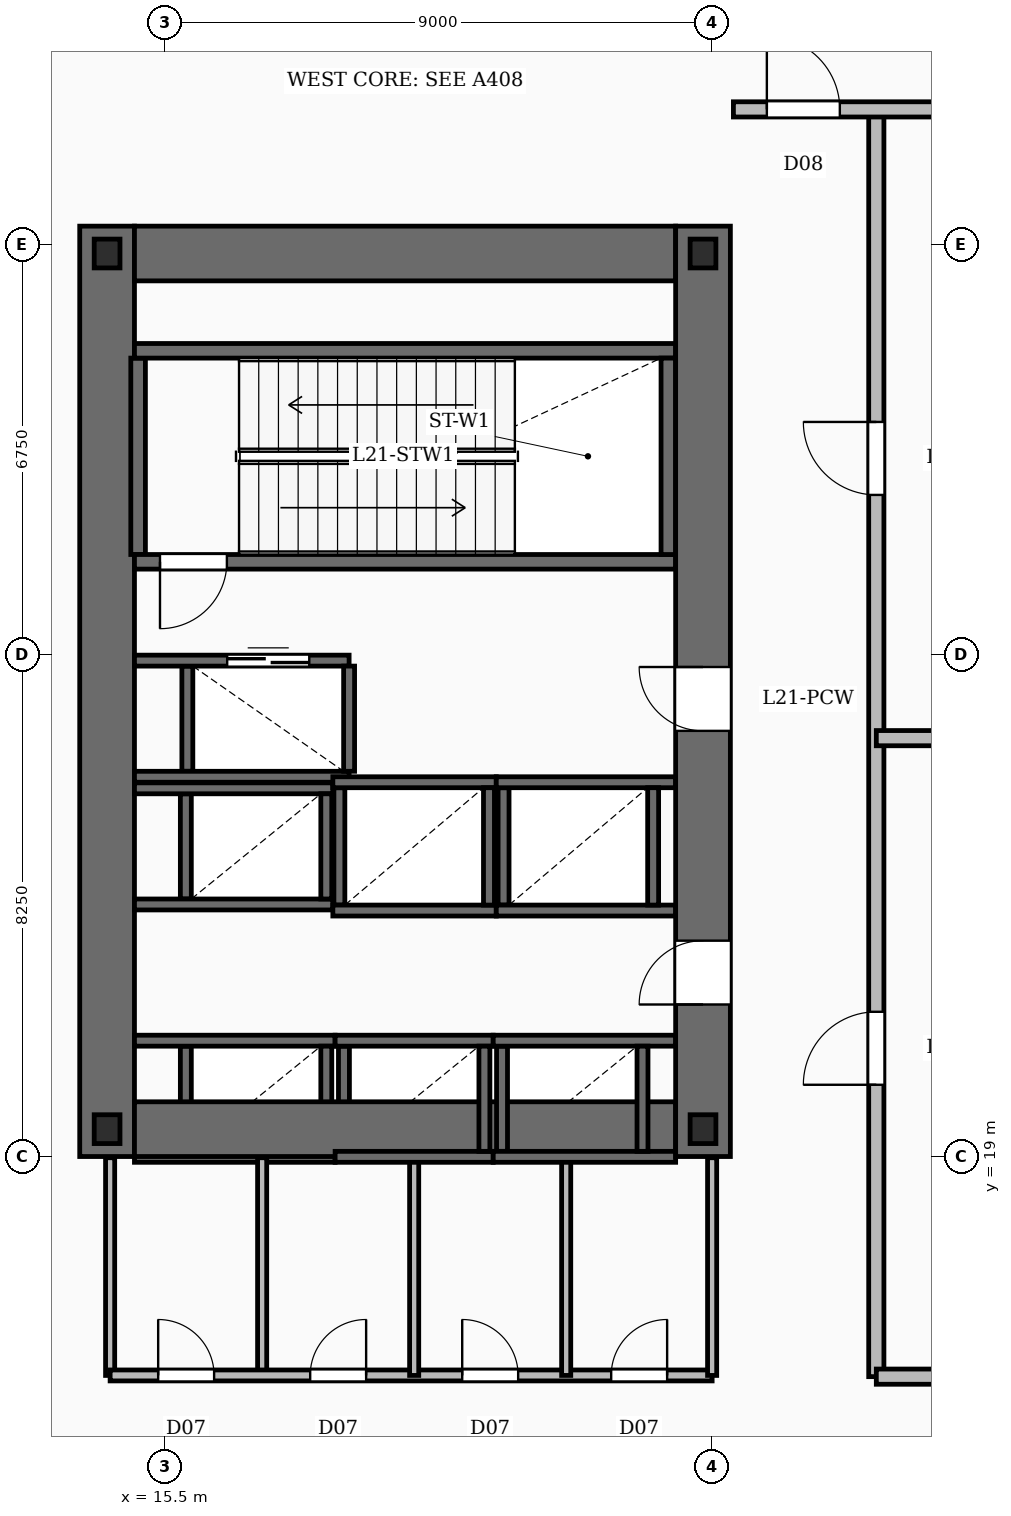
"""IFC4 building model, lengths in metres.
Left out: names, types, materials, properties, quantities, classifications, styles, units other than length and angle.
Written with IfcOpenShell. Run it as: python <this file> out.ifc"""

import sys

from ifc_helpers import new_model, si_unit, direction, frame, frame_2d, origin, origin_2d, place, context, subcontext, project, spatial, rectangle, i_section, extrude, element, fill, save


model = new_model("IFC4")
c1 = context("Model", 3, precision=1e-05, world=origin(), true_north=direction((0.0, 1.0)))
c2 = subcontext(c1, "Body", "Model", "MODEL_VIEW")
j1 = project(units=[si_unit("LENGTHUNIT", "METRE"), si_unit("PLANEANGLEUNIT", "RADIAN")], contexts=[c1])
p1 = place(None, origin())
s1 = spatial("IfcSite", under=j1, at=p1, CompositionType="ELEMENT")
p2 = place(p1, origin())
s2 = spatial("IfcBuilding", under=s1, at=p2, CompositionType="ELEMENT")
p3 = place(p2, frame((0.0, 0.0, 94.5)))
s3 = spatial("IfcBuildingStorey", under=s2, at=p3, CompositionType="ELEMENT", Elevation=94.5)
p4 = place(p3, frame((14.55, 19.0, -0.42), z_axis=(0.0, 0.0, 1.0), x_axis=(0.0, 1.0, 0.0)))
e1 = element("IfcWall", 1, at=p4, inside=s3, PredefinedType="SHEAR", context=c2, shape_type="SweptSolid", body=[
    extrude(rectangle(XDim=15.3, YDim=0.9, at=frame_2d((7.65, 0.0))), origin(), (0.0, 0.0, 1.0), 5.17),
])
p5 = place(p3, frame((24.35, 19.0, -0.42), z_axis=(0.0, 0.0, 1.0), x_axis=(0.0, 1.0, 0.0)))
e2 = element("IfcWall", 2, at=p5, inside=s3, PredefinedType="SHEAR", context=c2, shape_type="SweptSolid", body=[
    extrude(rectangle(XDim=15.3, YDim=0.9, at=frame_2d((7.65, 0.0))), origin(), (0.0, 0.0, 1.0), 5.17),
])
p6 = place(p5, frame((2.5, 0.0, 0.42)))
e3 = element("IfcOpeningElement", 3, at=p6, cuts=e2, PredefinedType="OPENING", context=c2, shape_type="SweptSolid", body=[
    extrude(rectangle(XDim=1.05, YDim=2.15, at=frame_2d((0.525, 1.075))), frame((0.0, 0.46, 0.0), z_axis=(0.0, -1.0, 0.0), x_axis=(1.0, 0.0, 0.0)), (0.0, 0.0, 1.0), 0.92),
])
p7 = place(p5, frame((7.0, 0.0, 0.42)))
e4 = element("IfcOpeningElement", 4, at=p7, cuts=e2, PredefinedType="OPENING", context=c2, shape_type="SweptSolid", body=[
    extrude(rectangle(XDim=1.05, YDim=2.15, at=frame_2d((0.525, 1.075))), frame((0.0, 0.46, 0.0), z_axis=(0.0, -1.0, 0.0), x_axis=(1.0, 0.0, 0.0)), (0.0, 0.0, 1.0), 0.92),
])
for number, where, z_axis, x_axis in (
    (5, (15.0, 19.45, -0.42), (0.0, 0.0, 1.0), (1.0, 0.0, 0.0)),
    (6, (15.0, 33.85, -0.42), (0.0, 0.0, 1.0), (1.0, 0.0, 0.0)),
):
    element("IfcWall", number, at=place(p3, frame(where, z_axis=z_axis, x_axis=x_axis)), inside=s3, PredefinedType="SHEAR", context=c2, shape_type="SweptSolid", body=[
        extrude(rectangle(XDim=8.9, YDim=0.9, at=frame_2d((4.45, 0.0))), origin(), (0.0, 0.0, 1.0), 5.17),
    ])
for number, where, z_axis, x_axis in (
    (7, (14.55, 19.45, -0.42), (0.0, 0.0, 1.0), (1.0, 0.0, 0.0)),
    (8, (24.35, 19.45, -0.42), (0.0, 0.0, 1.0), (1.0, 0.0, 0.0)),
    (9, (14.55, 33.85, -0.42), (0.0, 0.0, 1.0), (1.0, 0.0, 0.0)),
    (10, (24.35, 33.85, -0.42), (0.0, 0.0, 1.0), (1.0, 0.0, 0.0)),
):
    element("IfcColumn", number, at=place(p3, frame(where, z_axis=z_axis, x_axis=x_axis)), inside=s3, PredefinedType="COLUMN", context=c2, shape_type="SweptSolid", body=[
        extrude(i_section(OverallWidth=0.424, OverallDepth=0.474, WebThickness=0.048, FlangeThickness=0.077, FilletRadius=0.02, at=origin_2d()), origin(), (0.0, 0.0, 1.0), 5.17),
    ])
p8 = place(p3, frame((23.9, 28.78, 0.0), z_axis=(0.0, 0.0, 1.0), x_axis=(-1.0, 0.0, 0.0)))
e11 = element("IfcWall", 11, at=p8, inside=s3, PredefinedType="SOLIDWALL", context=c2, shape_type="SweptSolid", body=[
    extrude(rectangle(XDim=8.9, YDim=0.24, at=frame_2d((4.45, 0.0))), origin(), (0.0, 0.0, 1.0), 4.75),
])
p9 = place(p8, frame((7.38, 0.0, 0.0)))
e12 = element("IfcOpeningElement", 12, at=p9, cuts=e11, PredefinedType="OPENING", context=c2, shape_type="SweptSolid", body=[
    extrude(rectangle(XDim=1.1, YDim=2.15, at=frame_2d((0.55, 1.075))), frame((0.0, 0.13, 0.0), z_axis=(0.0, -1.0, 0.0), x_axis=(1.0, 0.0, 0.0)), (0.0, 0.0, 1.0), 0.26),
])
p10 = place(p3, frame((15.0, 32.25, 0.0), z_axis=(0.0, 0.0, 1.0), x_axis=(1.0, 0.0, 0.0)))
e13 = element("IfcWall", 13, at=p10, inside=s3, PredefinedType="SOLIDWALL", context=c2, shape_type="SweptSolid", body=[
    extrude(rectangle(XDim=8.9, YDim=0.24, at=frame_2d((4.45, 0.0))), origin(), (0.0, 0.0, 1.0), 4.75),
])
for number, where, z_axis, x_axis in (
    (14, (15.06, 28.9, 0.0), (0.0, 0.0, 1.0), (0.0, 1.0, 0.0)),
    (15, (23.78, 28.9, 0.0), (0.0, 0.0, 1.0), (0.0, 1.0, 0.0)),
):
    element("IfcWall", number, at=place(p3, frame(where, z_axis=z_axis, x_axis=x_axis)), inside=s3, PredefinedType="SOLIDWALL", context=c2, shape_type="SweptSolid", body=[
        extrude(rectangle(XDim=3.23, YDim=0.24, at=frame_2d((1.615, 0.0))), origin(), (0.0, 0.0, 1.0), 4.75),
    ])
for number, where, z_axis, x_axis in (
    (16, (15.0, 20.905, 0.0), (0.0, 0.0, 1.0), (1.0, 0.0, 0.0)),
    (17, (15.0, 18.995, 0.0), (0.0, 0.0, 1.0), (1.0, 0.0, 0.0)),
):
    element("IfcWall", number, at=place(p3, frame(where, z_axis=z_axis, x_axis=x_axis)), inside=s3, PredefinedType="SOLIDWALL", context=c2, shape_type="SweptSolid", body=[
        extrude(rectangle(XDim=3.3, YDim=0.18, at=frame_2d((1.65, 0.0))), origin(), (0.0, 0.0, 1.0), 4.75),
    ])
for number, where, z_axis, x_axis in (
    (18, (15.845, 19.085, 0.0), (0.0, 0.0, 1.0), (0.0, 1.0, 0.0)),
    (19, (18.155, 19.085, 0.0), (0.0, 0.0, 1.0), (0.0, 1.0, 0.0)),
):
    element("IfcWall", number, at=place(p3, frame(where, z_axis=z_axis, x_axis=x_axis)), inside=s3, PredefinedType="SOLIDWALL", context=c2, shape_type="SweptSolid", body=[
        extrude(rectangle(XDim=1.73, YDim=0.18, at=frame_2d((0.865, 0.0))), origin(), (0.0, 0.0, 1.0), 4.75),
    ])
for number, where, z_axis, x_axis in (
    (20, (18.3, 20.905, 0.0), (0.0, 0.0, 1.0), (1.0, 0.0, 0.0)),
    (21, (18.3, 18.995, 0.0), (0.0, 0.0, 1.0), (1.0, 0.0, 0.0)),
):
    element("IfcWall", number, at=place(p3, frame(where, z_axis=z_axis, x_axis=x_axis)), inside=s3, PredefinedType="SOLIDWALL", context=c2, shape_type="SweptSolid", body=[
        extrude(rectangle(XDim=2.6, YDim=0.18, at=frame_2d((1.3, 0.0))), origin(), (0.0, 0.0, 1.0), 4.75),
    ])
for number, where, z_axis, x_axis in (
    (22, (18.445, 19.085, 0.0), (0.0, 0.0, 1.0), (0.0, 1.0, 0.0)),
    (23, (20.755, 19.085, 0.0), (0.0, 0.0, 1.0), (0.0, 1.0, 0.0)),
):
    element("IfcWall", number, at=place(p3, frame(where, z_axis=z_axis, x_axis=x_axis)), inside=s3, PredefinedType="SOLIDWALL", context=c2, shape_type="SweptSolid", body=[
        extrude(rectangle(XDim=1.73, YDim=0.18, at=frame_2d((0.865, 0.0))), origin(), (0.0, 0.0, 1.0), 4.75),
    ])
for number, where, z_axis, x_axis in (
    (24, (20.9, 20.905, 0.0), (0.0, 0.0, 1.0), (1.0, 0.0, 0.0)),
    (25, (20.9, 18.995, 0.0), (0.0, 0.0, 1.0), (1.0, 0.0, 0.0)),
):
    element("IfcWall", number, at=place(p3, frame(where, z_axis=z_axis, x_axis=x_axis)), inside=s3, PredefinedType="SOLIDWALL", context=c2, shape_type="SweptSolid", body=[
        extrude(rectangle(XDim=3.0, YDim=0.18, at=frame_2d((1.5, 0.0))), origin(), (0.0, 0.0, 1.0), 4.75),
    ])
for number, where, z_axis, x_axis in (
    (26, (21.045, 19.085, 0.0), (0.0, 0.0, 1.0), (0.0, 1.0, 0.0)),
    (27, (23.355, 19.085, 0.0), (0.0, 0.0, 1.0), (0.0, 1.0, 0.0)),
):
    element("IfcWall", number, at=place(p3, frame(where, z_axis=z_axis, x_axis=x_axis)), inside=s3, PredefinedType="SOLIDWALL", context=c2, shape_type="SweptSolid", body=[
        extrude(rectangle(XDim=1.73, YDim=0.18, at=frame_2d((0.865, 0.0))), origin(), (0.0, 0.0, 1.0), 4.75),
    ])
for number, where, z_axis, x_axis in (
    (28, (15.0, 25.055, 0.0), (0.0, 0.0, 1.0), (1.0, 0.0, 0.0)),
    (29, (15.0, 23.145, 0.0), (0.0, 0.0, 1.0), (1.0, 0.0, 0.0)),
):
    element("IfcWall", number, at=place(p3, frame(where, z_axis=z_axis, x_axis=x_axis)), inside=s3, PredefinedType="SOLIDWALL", context=c2, shape_type="SweptSolid", body=[
        extrude(rectangle(XDim=3.262, YDim=0.18, at=frame_2d((1.631, 0.0))), origin(), (0.0, 0.0, 1.0), 4.75),
    ])
for number, where, z_axis, x_axis in (
    (30, (15.845, 23.235, 0.0), (0.0, 0.0, 1.0), (0.0, 1.0, 0.0)),
    (31, (18.155, 23.235, 0.0), (0.0, 0.0, 1.0), (0.0, 1.0, 0.0)),
):
    element("IfcWall", number, at=place(p3, frame(where, z_axis=z_axis, x_axis=x_axis)), inside=s3, PredefinedType="SOLIDWALL", context=c2, shape_type="SweptSolid", body=[
        extrude(rectangle(XDim=1.73, YDim=0.18, at=frame_2d((0.865, 0.0))), origin(), (0.0, 0.0, 1.0), 4.75),
    ])
for number, where, z_axis, x_axis in (
    (32, (18.262, 25.155, 0.0), (0.0, 0.0, 1.0), (1.0, 0.0, 0.0)),
    (33, (18.262, 23.045, 0.0), (0.0, 0.0, 1.0), (1.0, 0.0, 0.0)),
):
    element("IfcWall", number, at=place(p3, frame(where, z_axis=z_axis, x_axis=x_axis)), inside=s3, PredefinedType="SOLIDWALL", context=c2, shape_type="SweptSolid", body=[
        extrude(rectangle(XDim=2.688, YDim=0.18, at=frame_2d((1.344, 0.0))), origin(), (0.0, 0.0, 1.0), 4.75),
    ])
for number, where, z_axis, x_axis in (
    (34, (18.37, 23.135, 0.0), (0.0, 0.0, 1.0), (0.0, 1.0, 0.0)),
    (35, (20.83, 23.135, 0.0), (0.0, 0.0, 1.0), (0.0, 1.0, 0.0)),
):
    element("IfcWall", number, at=place(p3, frame(where, z_axis=z_axis, x_axis=x_axis)), inside=s3, PredefinedType="SOLIDWALL", context=c2, shape_type="SweptSolid", body=[
        extrude(rectangle(XDim=1.93, YDim=0.18, at=frame_2d((0.965, 0.0))), origin(), (0.0, 0.0, 1.0), 4.75),
    ])
for number, where, z_axis, x_axis in (
    (36, (20.95, 25.155, 0.0), (0.0, 0.0, 1.0), (1.0, 0.0, 0.0)),
    (37, (20.95, 23.045, 0.0), (0.0, 0.0, 1.0), (1.0, 0.0, 0.0)),
):
    element("IfcWall", number, at=place(p3, frame(where, z_axis=z_axis, x_axis=x_axis)), inside=s3, PredefinedType="SOLIDWALL", context=c2, shape_type="SweptSolid", body=[
        extrude(rectangle(XDim=2.95, YDim=0.18, at=frame_2d((1.475, 0.0))), origin(), (0.0, 0.0, 1.0), 4.75),
    ])
for number, where, z_axis, x_axis in (
    (38, (21.07, 23.135, 0.0), (0.0, 0.0, 1.0), (0.0, 1.0, 0.0)),
    (39, (23.53, 23.135, 0.0), (0.0, 0.0, 1.0), (0.0, 1.0, 0.0)),
):
    element("IfcWall", number, at=place(p3, frame(where, z_axis=z_axis, x_axis=x_axis)), inside=s3, PredefinedType="SOLIDWALL", context=c2, shape_type="SweptSolid", body=[
        extrude(rectangle(XDim=1.93, YDim=0.18, at=frame_2d((0.965, 0.0))), origin(), (0.0, 0.0, 1.0), 4.75),
    ])
p11 = place(p3, frame((15.0, 27.155, 0.0), z_axis=(0.0, 0.0, 1.0), x_axis=(1.0, 0.0, 0.0)))
e40 = element("IfcWall", 40, at=p11, inside=s3, PredefinedType="SOLIDWALL", context=c2, shape_type="SweptSolid", body=[
    extrude(rectangle(XDim=3.53, YDim=0.18, at=frame_2d((1.765, 0.0))), origin(), (0.0, 0.0, 1.0), 4.75),
])
p12 = place(p11, frame((1.525, 0.0, 0.0)))
e41 = element("IfcOpeningElement", 41, at=p12, cuts=e40, PredefinedType="OPENING", context=c2, shape_type="SweptSolid", body=[
    extrude(rectangle(XDim=1.35, YDim=2.3, at=frame_2d((0.675, 1.15))), frame((0.0, 0.1, 0.0), z_axis=(0.0, -1.0, 0.0), x_axis=(1.0, 0.0, 0.0)), (0.0, 0.0, 1.0), 0.2),
])
p13 = place(p3, frame((15.0, 25.245, 0.0), z_axis=(0.0, 0.0, 1.0), x_axis=(1.0, 0.0, 0.0)))
e42 = element("IfcWall", 42, at=p13, inside=s3, PredefinedType="SOLIDWALL", context=c2, shape_type="SweptSolid", body=[
    extrude(rectangle(XDim=3.53, YDim=0.18, at=frame_2d((1.765, 0.0))), origin(), (0.0, 0.0, 1.0), 4.75),
])
for number, where, z_axis, x_axis in (
    (43, (15.87, 25.335, 0.0), (0.0, 0.0, 1.0), (0.0, 1.0, 0.0)),
    (44, (18.53, 25.335, 0.0), (0.0, 0.0, 1.0), (0.0, 1.0, 0.0)),
):
    element("IfcWall", number, at=place(p3, frame(where, z_axis=z_axis, x_axis=x_axis)), inside=s3, PredefinedType="SOLIDWALL", context=c2, shape_type="SweptSolid", body=[
        extrude(rectangle(XDim=1.73, YDim=0.18, at=frame_2d((0.865, 0.0))), origin(), (0.0, 0.0, 1.0), 4.75),
    ])
for number, where, z_axis, x_axis in (
    (45, (17.1, 15.4, 0.0), (0.0, 0.0, 1.0), (0.0, 1.0, 0.0)),
    (46, (19.6, 15.4, 0.0), (0.0, 0.0, 1.0), (0.0, 1.0, 0.0)),
    (47, (22.1, 15.4, 0.0), (0.0, 0.0, 1.0), (0.0, 1.0, 0.0)),
):
    element("IfcWall", number, at=place(p3, frame(where, z_axis=z_axis, x_axis=x_axis)), inside=s3, PredefinedType="PARTITIONING", context=c2, shape_type="SweptSolid", body=[
        extrude(rectangle(XDim=3.58, YDim=0.15, at=frame_2d((1.79, 0.0))), origin(), (0.0, 0.0, 1.0), 3.81),
    ])
p14 = place(p3, frame((14.6, 15.4, 0.0), z_axis=(0.0, 0.0, 1.0), x_axis=(1.0, 0.0, 0.0)))
e48 = element("IfcWall", 48, at=p14, inside=s3, PredefinedType="PARTITIONING", context=c2, shape_type="SweptSolid", body=[
    extrude(rectangle(XDim=9.9, YDim=0.18, at=frame_2d((4.95, 0.0))), origin(), (0.0, 0.0, 1.0), 3.81),
])
p15 = place(p14, frame((0.79, 0.0, 0.0)))
e49 = element("IfcOpeningElement", 49, at=p15, cuts=e48, PredefinedType="OPENING", context=c2, shape_type="SweptSolid", body=[
    extrude(rectangle(XDim=0.92, YDim=2.1, at=frame_2d((0.46, 1.05))), frame((0.0, 0.1, 0.0), z_axis=(0.0, -1.0, 0.0), x_axis=(1.0, 0.0, 0.0)), (0.0, 0.0, 1.0), 0.2),
])
p16 = place(p14, frame((3.29, 0.0, 0.0)))
e50 = element("IfcOpeningElement", 50, at=p16, cuts=e48, PredefinedType="OPENING", context=c2, shape_type="SweptSolid", body=[
    extrude(rectangle(XDim=0.92, YDim=2.1, at=frame_2d((0.46, 1.05))), frame((0.0, 0.1, 0.0), z_axis=(0.0, -1.0, 0.0), x_axis=(1.0, 0.0, 0.0)), (0.0, 0.0, 1.0), 0.2),
])
p17 = place(p14, frame((5.79, 0.0, 0.0)))
e51 = element("IfcOpeningElement", 51, at=p17, cuts=e48, PredefinedType="OPENING", context=c2, shape_type="SweptSolid", body=[
    extrude(rectangle(XDim=0.92, YDim=2.1, at=frame_2d((0.46, 1.05))), frame((0.0, 0.1, 0.0), z_axis=(0.0, -1.0, 0.0), x_axis=(1.0, 0.0, 0.0)), (0.0, 0.0, 1.0), 0.2),
])
p18 = place(p14, frame((8.24, 0.0, 0.0)))
e52 = element("IfcOpeningElement", 52, at=p18, cuts=e48, PredefinedType="OPENING", context=c2, shape_type="SweptSolid", body=[
    extrude(rectangle(XDim=0.92, YDim=2.1, at=frame_2d((0.46, 1.05))), frame((0.0, 0.1, 0.0), z_axis=(0.0, -1.0, 0.0), x_axis=(1.0, 0.0, 0.0)), (0.0, 0.0, 1.0), 0.2),
])
p19 = place(p3, frame((14.6, 15.4, 0.0), z_axis=(0.0, 0.0, 1.0), x_axis=(0.0, 1.0, 0.0)))
e53 = element("IfcWall", 53, at=p19, inside=s3, PredefinedType="PARTITIONING", context=c2, shape_type="SweptSolid", body=[
    extrude(rectangle(XDim=3.58, YDim=0.15, at=frame_2d((1.79, 0.0))), origin(), (0.0, 0.0, 1.0), 2.8),
])
p20 = place(p3, frame((24.5, 15.4, 0.0), z_axis=(0.0, 0.0, 1.0), x_axis=(0.0, 1.0, 0.0)))
e54 = element("IfcWall", 54, at=p20, inside=s3, PredefinedType="PARTITIONING", context=c2, shape_type="SweptSolid", body=[
    extrude(rectangle(XDim=3.58, YDim=0.15, at=frame_2d((1.79, 0.0))), origin(), (0.0, 0.0, 1.0), 3.81),
])
for number, where, z_axis, x_axis in (
    (55, (27.2, 25.88, 0.0), (0.0, 0.0, 1.0), (1.0, 0.0, 0.0)),
    (56, (27.2, 15.38, 0.0), (0.0, 0.0, 1.0), (1.0, 0.0, 0.0)),
):
    element("IfcWall", number, at=place(p3, frame(where, z_axis=z_axis, x_axis=x_axis)), inside=s3, PredefinedType="SOLIDWALL", context=c2, shape_type="SweptSolid", body=[
        extrude(rectangle(XDim=20.5, YDim=0.25, at=frame_2d((10.25, 0.0))), origin(), (0.0, 0.0, 1.0), 3.81),
    ])
p21 = place(p3, frame((24.85, 36.22, 0.0), z_axis=(0.0, 0.0, 1.0), x_axis=(1.0, 0.0, 0.0)))
e57 = element("IfcWall", 57, at=p21, inside=s3, PredefinedType="SOLIDWALL", context=c2, shape_type="SweptSolid", body=[
    extrude(rectangle(XDim=25.2, YDim=0.25, at=frame_2d((12.6, 0.0))), origin(), (0.0, 0.0, 1.0), 3.81),
])
p22 = place(p21, frame((0.55, 0.0, 0.0)))
e58 = element("IfcOpeningElement", 58, at=p22, cuts=e57, PredefinedType="OPENING", context=c2, shape_type="SweptSolid", body=[
    extrude(rectangle(XDim=1.2, YDim=2.2, at=frame_2d((0.6, 1.1))), frame((0.0, 0.135, 0.0), z_axis=(0.0, -1.0, 0.0), x_axis=(1.0, 0.0, 0.0)), (0.0, 0.0, 1.0), 0.27),
])
p23 = place(p3, frame((27.2, 15.38, 0.0), z_axis=(0.0, 0.0, 1.0), x_axis=(0.0, 1.0, 0.0)))
e59 = element("IfcWall", 59, at=p23, inside=s3, PredefinedType="SOLIDWALL", context=c2, shape_type="SweptSolid", body=[
    extrude(rectangle(XDim=20.84, YDim=0.25, at=frame_2d((10.42, 0.0))), origin(), (0.0, 0.0, 1.0), 3.81),
])
p24 = place(p23, frame((4.8, 0.0, 0.0)))
e60 = element("IfcOpeningElement", 60, at=p24, cuts=e59, PredefinedType="OPENING", context=c2, shape_type="SweptSolid", body=[
    extrude(rectangle(XDim=1.2, YDim=2.2, at=frame_2d((0.6, 1.1))), frame((0.0, 0.135, 0.0), z_axis=(0.0, -1.0, 0.0), x_axis=(1.0, 0.0, 0.0)), (0.0, 0.0, 1.0), 0.27),
])
p25 = place(p23, frame((14.5, 0.0, 0.0)))
e61 = element("IfcOpeningElement", 61, at=p25, cuts=e59, PredefinedType="OPENING", context=c2, shape_type="SweptSolid", body=[
    extrude(rectangle(XDim=1.2, YDim=2.2, at=frame_2d((0.6, 1.1))), frame((0.0, 0.135, 0.0), z_axis=(0.0, -1.0, 0.0), x_axis=(1.0, 0.0, 0.0)), (0.0, 0.0, 1.0), 0.27),
])
p26 = place(p6, origin())
e62 = element("IfcDoor", 62, at=p26, inside=s3, OperationType="SINGLE_SWING_LEFT", PredefinedType="DOOR", context=c2, shape_type="SweptSolid", body=[
    extrude(rectangle(XDim=1.05, YDim=2.15, at=frame_2d((0.525, 1.075))), frame((0.0, 0.025, 0.0), z_axis=(0.0, -1.0, 0.0), x_axis=(1.0, 0.0, 0.0)), (0.0, 0.0, 1.0), 0.05),
])
fill(e3, e62)
p27 = place(p7, origin())
e63 = element("IfcDoor", 63, at=p27, inside=s3, OperationType="SINGLE_SWING_RIGHT", PredefinedType="DOOR", context=c2, shape_type="SweptSolid", body=[
    extrude(rectangle(XDim=1.05, YDim=2.15, at=frame_2d((0.525, 1.075))), frame((0.0, 0.025, 0.0), z_axis=(0.0, -1.0, 0.0), x_axis=(1.0, 0.0, 0.0)), (0.0, 0.0, 1.0), 0.05),
])
fill(e4, e63)
p28 = place(p9, origin())
e64 = element("IfcDoor", 64, at=p28, inside=s3, OperationType="SINGLE_SWING_RIGHT", PredefinedType="DOOR", context=c2, shape_type="SweptSolid", body=[
    extrude(rectangle(XDim=1.1, YDim=2.15, at=frame_2d((0.55, 1.075))), frame((0.0, 0.025, 0.0), z_axis=(0.0, -1.0, 0.0), x_axis=(1.0, 0.0, 0.0)), (0.0, 0.0, 1.0), 0.05),
])
fill(e12, e64)
p29 = place(p12, origin())
e65 = element("IfcDoor", 65, at=p29, inside=s3, OperationType="DOUBLE_DOOR_SLIDING", PredefinedType="DOOR", context=c2, shape_type="SweptSolid", body=[
    extrude(rectangle(XDim=1.35, YDim=2.3, at=frame_2d((0.675, 1.15))), frame((0.0, 0.025, 0.0), z_axis=(0.0, -1.0, 0.0), x_axis=(1.0, 0.0, 0.0)), (0.0, 0.0, 1.0), 0.05),
])
fill(e41, e65)
p30 = place(p15, origin())
e66 = element("IfcDoor", 66, at=p30, inside=s3, OperationType="SINGLE_SWING_LEFT", PredefinedType="DOOR", context=c2, shape_type="SweptSolid", body=[
    extrude(rectangle(XDim=0.92, YDim=2.1, at=frame_2d((0.46, 1.05))), frame((0.0, 0.025, 0.0), z_axis=(0.0, -1.0, 0.0), x_axis=(1.0, 0.0, 0.0)), (0.0, 0.0, 1.0), 0.05),
])
fill(e49, e66)
p31 = place(p16, origin())
e67 = element("IfcDoor", 67, at=p31, inside=s3, OperationType="SINGLE_SWING_RIGHT", PredefinedType="DOOR", context=c2, shape_type="SweptSolid", body=[
    extrude(rectangle(XDim=0.92, YDim=2.1, at=frame_2d((0.46, 1.05))), frame((0.0, 0.025, 0.0), z_axis=(0.0, -1.0, 0.0), x_axis=(1.0, 0.0, 0.0)), (0.0, 0.0, 1.0), 0.05),
])
fill(e50, e67)
p32 = place(p17, origin())
e68 = element("IfcDoor", 68, at=p32, inside=s3, OperationType="SINGLE_SWING_LEFT", PredefinedType="DOOR", context=c2, shape_type="SweptSolid", body=[
    extrude(rectangle(XDim=0.92, YDim=2.1, at=frame_2d((0.46, 1.05))), frame((0.0, 0.025, 0.0), z_axis=(0.0, -1.0, 0.0), x_axis=(1.0, 0.0, 0.0)), (0.0, 0.0, 1.0), 0.05),
])
fill(e51, e68)
p33 = place(p18, origin())
e69 = element("IfcDoor", 69, at=p33, inside=s3, OperationType="SINGLE_SWING_RIGHT", PredefinedType="DOOR", context=c2, shape_type="SweptSolid", body=[
    extrude(rectangle(XDim=0.92, YDim=2.1, at=frame_2d((0.46, 1.05))), frame((0.0, 0.025, 0.0), z_axis=(0.0, -1.0, 0.0), x_axis=(1.0, 0.0, 0.0)), (0.0, 0.0, 1.0), 0.05),
])
fill(e52, e69)
p34 = place(p22, origin())
e70 = element("IfcDoor", 70, at=p34, inside=s3, OperationType="SINGLE_SWING_LEFT", PredefinedType="DOOR", context=c2, shape_type="SweptSolid", body=[
    extrude(rectangle(XDim=1.2, YDim=2.2, at=frame_2d((0.6, 1.1))), frame((0.0, 0.025, 0.0), z_axis=(0.0, -1.0, 0.0), x_axis=(1.0, 0.0, 0.0)), (0.0, 0.0, 1.0), 0.05),
])
fill(e58, e70)
p35 = place(p24, origin())
e71 = element("IfcDoor", 71, at=p35, inside=s3, OperationType="SINGLE_SWING_LEFT", PredefinedType="DOOR", context=c2, shape_type="SweptSolid", body=[
    extrude(rectangle(XDim=1.2, YDim=2.2, at=frame_2d((0.6, 1.1))), frame((0.0, 0.025, 0.0), z_axis=(0.0, -1.0, 0.0), x_axis=(1.0, 0.0, 0.0)), (0.0, 0.0, 1.0), 0.05),
])
fill(e60, e71)
p36 = place(p25, origin())
e72 = element("IfcDoor", 72, at=p36, inside=s3, OperationType="SINGLE_SWING_RIGHT", PredefinedType="DOOR", context=c2, shape_type="SweptSolid", body=[
    extrude(rectangle(XDim=1.2, YDim=2.2, at=frame_2d((0.6, 1.1))), frame((0.0, 0.025, 0.0), z_axis=(0.0, -1.0, 0.0), x_axis=(1.0, 0.0, 0.0)), (0.0, 0.0, 1.0), 0.05),
])
fill(e61, e72)
save(model, sys.argv[1])
